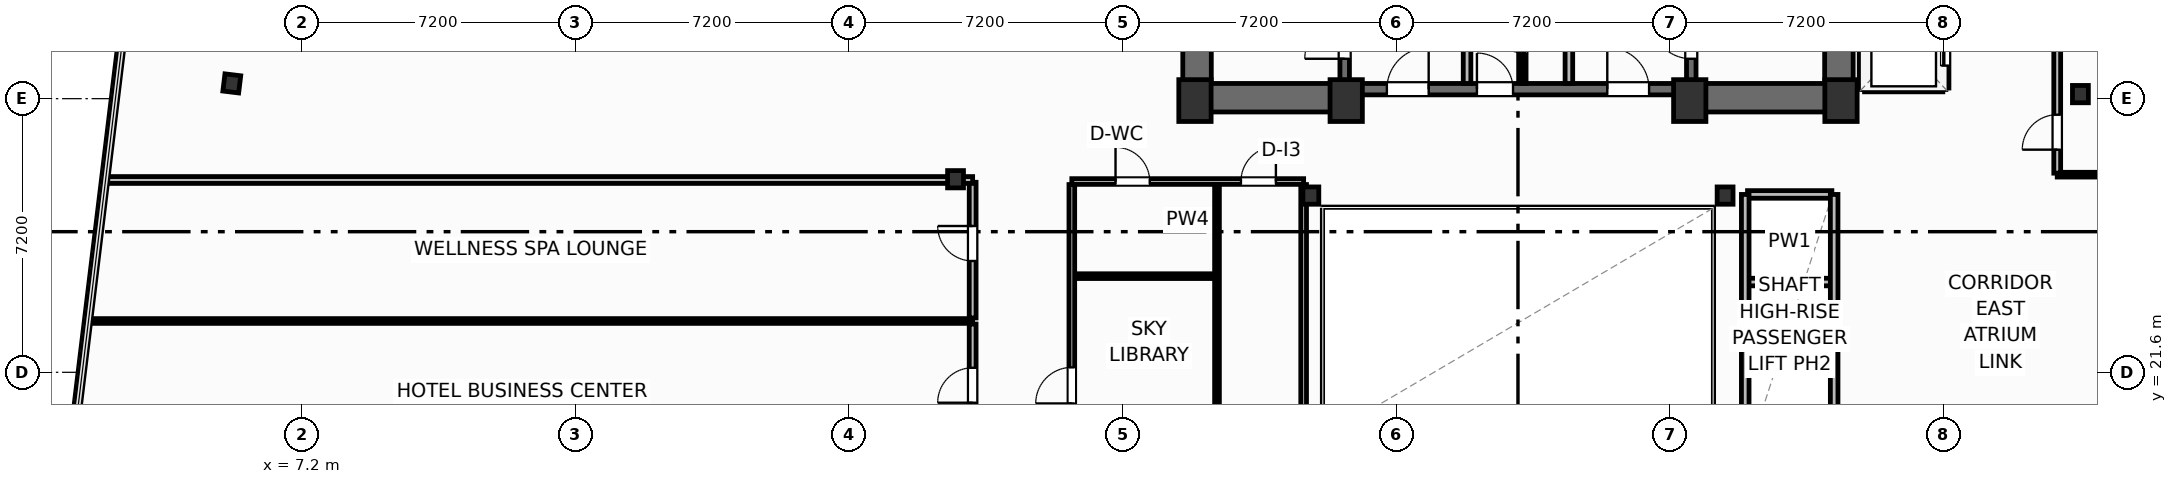
"""IFC4 building model, lengths in metres.
Left out: names, types, materials, properties, quantities, classifications, styles, units other than length and angle.
Written with IfcOpenShell. Run it as: python <this file> out.ifc"""

import sys

from ifc_helpers import new_model, si_unit, direction, frame, frame_2d, origin, origin_2d, place, context, subcontext, project, spatial, rectangle, i_section, extrude, element, fill, save


model = new_model("IFC4")
c1 = context("Model", 3, precision=1e-05, world=origin(), true_north=direction((0.0, 1.0)))
c2 = subcontext(c1, "Body", "Model", "MODEL_VIEW")
j1 = project(units=[si_unit("LENGTHUNIT", "METRE"), si_unit("PLANEANGLEUNIT", "RADIAN")], contexts=[c1])
p1 = place(None, origin())
s1 = spatial("IfcSite", under=j1, at=p1, CompositionType="ELEMENT")
p2 = place(p1, origin())
s2 = spatial("IfcBuilding", under=s1, at=p2, CompositionType="ELEMENT")
p3 = place(p2, frame((0.0, 0.0, 151.3)))
s3 = spatial("IfcBuildingStorey", under=s2, at=p3, CompositionType="ELEMENT", Elevation=151.3)
for number, where, z_axis, x_axis in (
    (1, (30.7, 28.75, 0.0), (0.0, 0.0, 1.0), (1.0, 0.0, 0.0)),
    (2, (34.68, 28.75, 0.0), (0.0, 0.0, 1.0), (1.0, 0.0, 0.0)),
    (3, (43.72, 28.75, 0.0), (0.0, 0.0, 1.0), (1.0, 0.0, 0.0)),
    (4, (47.7, 28.75, 0.0), (0.0, 0.0, 1.0), (1.0, 0.0, 0.0)),
):
    element("IfcColumn", number, at=place(p3, frame(where, z_axis=z_axis, x_axis=x_axis)), inside=s3, PredefinedType="COLUMN", context=c2, shape_type="SweptSolid", body=[
        extrude(rectangle(XDim=0.85, YDim=1.1, at=origin_2d()), origin(), (0.0, 0.0, 1.0), 3.7),
    ])
for number, where, z_axis, x_axis in (
    (5, (33.75, 26.25, 0.0), (0.0, 0.0, 1.0), (1.0, 0.0, 0.0)),
    (6, (44.65, 26.25, 0.0), (0.0, 0.0, 1.0), (1.0, 0.0, 0.0)),
    (7, (24.4, 26.68, 0.0), (0.0, 0.0, 1.0), (1.0, 0.0, 0.0)),
    (8, (54.0, 28.92, 0.0), (0.0, 0.0, 1.0), (1.0, 0.0, 0.0)),
):
    element("IfcColumn", number, at=place(p3, frame(where, z_axis=z_axis, x_axis=x_axis)), inside=s3, PredefinedType="COLUMN", context=c2, shape_type="SweptSolid", body=[
        extrude(i_section(OverallWidth=0.418, OverallDepth=0.455, WebThickness=0.042, FlangeThickness=0.068, FilletRadius=0.025, at=origin_2d()), origin(), (0.0, 0.0, 1.0), 3.7),
    ])
for number, where, z_axis, x_axis in (
    (9, (30.755, 29.2, 0.0), (0.0, 0.0, 1.0), (0.0, 1.0, 0.0)),
    (10, (47.645, 29.2, 0.0), (0.0, 0.0, 1.0), (0.0, 1.0, 0.0)),
):
    element("IfcWall", number, at=place(p3, frame(where, z_axis=z_axis, x_axis=x_axis)), inside=s3, PredefinedType="SHEAR", context=c2, shape_type="SweptSolid", body=[
        extrude(rectangle(XDim=9.22, YDim=0.75, at=frame_2d((4.61, 0.0))), origin(), (0.0, 0.0, 1.0), 3.45),
    ])
p4 = place(p3, frame((30.38, 28.825, 0.0), z_axis=(0.0, 0.0, 1.0), x_axis=(1.0, 0.0, 0.0)))
e11 = element("IfcWall", 11, at=p4, inside=s3, PredefinedType="SHEAR", context=c2, shape_type="SweptSolid", body=[
    extrude(rectangle(XDim=4.42, YDim=0.75, at=frame_2d((2.21, 0.0))), origin(), (0.0, 0.0, 1.0), 3.45),
])
p5 = place(p3, frame((43.6, 28.825, 0.0), z_axis=(0.0, 0.0, 1.0), x_axis=(1.0, 0.0, 0.0)))
e12 = element("IfcWall", 12, at=p5, inside=s3, PredefinedType="SHEAR", context=c2, shape_type="SweptSolid", body=[
    extrude(rectangle(XDim=4.42, YDim=0.75, at=frame_2d((2.21, 0.0))), origin(), (0.0, 0.0, 1.0), 3.45),
])
p6 = place(p3, frame((34.8, 29.05, 0.0), z_axis=(0.0, 0.0, 1.0), x_axis=(1.0, 0.0, 0.0)))
e13 = element("IfcWall", 13, at=p6, inside=s3, PredefinedType="SHEAR", context=c2, shape_type="SweptSolid", body=[
    extrude(rectangle(XDim=8.8, YDim=0.3, at=frame_2d((4.4, 0.0))), origin(), (0.0, 0.0, 1.0), 3.45),
])
p7 = place(p6, frame((0.95, 0.0, 0.0)))
e14 = element("IfcOpeningElement", 14, at=p7, cuts=e13, PredefinedType="OPENING", context=c2, shape_type="SweptSolid", body=[
    extrude(rectangle(XDim=1.1, YDim=2.15, at=frame_2d((0.55, 1.075))), frame((0.0, 0.16, 0.0), z_axis=(0.0, -1.0, 0.0), x_axis=(1.0, 0.0, 0.0)), (0.0, 0.0, 1.0), 0.32),
])
p8 = place(p6, frame((6.75, 0.0, 0.0)))
e15 = element("IfcOpeningElement", 15, at=p8, cuts=e13, PredefinedType="OPENING", context=c2, shape_type="SweptSolid", body=[
    extrude(rectangle(XDim=1.1, YDim=2.15, at=frame_2d((0.55, 1.075))), frame((0.0, 0.16, 0.0), z_axis=(0.0, -1.0, 0.0), x_axis=(1.0, 0.0, 0.0)), (0.0, 0.0, 1.0), 0.32),
])
p9 = place(p6, frame((3.32, 0.0, 0.0)))
e16 = element("IfcOpeningElement", 16, at=p9, cuts=e13, PredefinedType="OPENING", context=c2, shape_type="SweptSolid", body=[
    extrude(rectangle(XDim=0.95, YDim=2.15, at=frame_2d((0.475, 1.075))), frame((0.0, 0.16, 0.0), z_axis=(0.0, -1.0, 0.0), x_axis=(1.0, 0.0, 0.0)), (0.0, 0.0, 1.0), 0.32),
])
p10 = place(p3, frame((34.64, 29.2, 0.0), z_axis=(0.0, 0.0, 1.0), x_axis=(0.0, 1.0, 0.0)))
e17 = element("IfcWall", 17, at=p10, inside=s3, PredefinedType="SHEAR", context=c2, shape_type="SweptSolid", body=[
    extrude(rectangle(XDim=9.22, YDim=0.25, at=frame_2d((4.61, 0.0))), origin(), (0.0, 0.0, 1.0), 3.45),
])
p11 = place(p10, frame((0.65, 0.0, 0.0)))
e18 = element("IfcOpeningElement", 18, at=p11, cuts=e17, PredefinedType="OPENING", context=c2, shape_type="SweptSolid", body=[
    extrude(rectangle(XDim=1.05, YDim=2.15, at=frame_2d((0.525, 1.075))), frame((0.0, 0.135, 0.0), z_axis=(0.0, -1.0, 0.0), x_axis=(1.0, 0.0, 0.0)), (0.0, 0.0, 1.0), 0.27),
])
p12 = place(p3, frame((43.76, 29.2, 0.0), z_axis=(0.0, 0.0, 1.0), x_axis=(0.0, 1.0, 0.0)))
e19 = element("IfcWall", 19, at=p12, inside=s3, PredefinedType="SHEAR", context=c2, shape_type="SweptSolid", body=[
    extrude(rectangle(XDim=9.22, YDim=0.25, at=frame_2d((4.61, 0.0))), origin(), (0.0, 0.0, 1.0), 3.45),
])
p13 = place(p12, frame((0.65, 0.0, 0.0)))
e20 = element("IfcOpeningElement", 20, at=p13, cuts=e19, PredefinedType="OPENING", context=c2, shape_type="SweptSolid", body=[
    extrude(rectangle(XDim=1.05, YDim=2.15, at=frame_2d((0.525, 1.075))), frame((0.0, 0.135, 0.0), z_axis=(0.0, -1.0, 0.0), x_axis=(1.0, 0.0, 0.0)), (0.0, 0.0, 1.0), 0.27),
])
p14 = place(p3, frame((5.355, 29.201, 0.0), z_axis=(0.0, 0.0, 1.0), x_axis=(0.992732158755, -0.12034475881, 0.0)))
e21 = element("IfcColumn", 21, at=p14, inside=s3, PredefinedType="COLUMN", context=c2, shape_type="SweptSolid", body=[
    extrude(i_section(OverallWidth=0.418, OverallDepth=0.455, WebThickness=0.042, FlangeThickness=0.068, FilletRadius=0.025, at=origin_2d()), origin(), (0.0, 0.0, 1.0), 3.7),
])
p15 = place(p3, frame((24.85, 19.3, 0.0), z_axis=(0.0, 0.0, 1.0), x_axis=(0.0, 1.0, 0.0)))
e22 = element("IfcWall", 22, at=p15, inside=s3, PredefinedType="PARTITIONING", context=c2, shape_type="SweptSolid", body=[
    extrude(rectangle(XDim=3.57, YDim=0.18, at=frame_2d((1.785, 0.0))), origin(), (0.0, 0.0, 1.0), 3.45),
])
p16 = place(p15, frame((1.5, 0.0, 0.0)))
e23 = element("IfcOpeningElement", 23, at=p16, cuts=e22, PredefinedType="OPENING", context=c2, shape_type="SweptSolid", body=[
    extrude(rectangle(XDim=0.92, YDim=2.05, at=frame_2d((0.46, 1.025))), frame((0.0, 0.1, 0.0), z_axis=(0.0, -1.0, 0.0), x_axis=(1.0, 0.0, 0.0)), (0.0, 0.0, 1.0), 0.2),
])
p17 = place(p3, frame((24.85, 23.03, 0.0), z_axis=(0.0, 0.0, 1.0), x_axis=(0.0, 1.0, 0.0)))
e24 = element("IfcWall", 24, at=p17, inside=s3, PredefinedType="PARTITIONING", context=c2, shape_type="SweptSolid", body=[
    extrude(rectangle(XDim=3.57, YDim=0.18, at=frame_2d((1.785, 0.0))), origin(), (0.0, 0.0, 1.0), 3.45),
])
p18 = place(p17, frame((1.5, 0.0, 0.0)))
e25 = element("IfcOpeningElement", 25, at=p18, cuts=e24, PredefinedType="OPENING", context=c2, shape_type="SweptSolid", body=[
    extrude(rectangle(XDim=0.92, YDim=2.05, at=frame_2d((0.46, 1.025))), frame((0.0, 0.1, 0.0), z_axis=(0.0, -1.0, 0.0), x_axis=(1.0, 0.0, 0.0)), (0.0, 0.0, 1.0), 0.2),
])
p19 = place(p3, frame((1.624, 22.95, 0.0), z_axis=(0.0, 0.0, 1.0), x_axis=(1.0, 0.0, 0.0)))
e26 = element("IfcWall", 26, at=p19, inside=s3, PredefinedType="PARTITIONING", context=c2, shape_type="SweptSolid", body=[
    extrude(rectangle(XDim=23.226, YDim=0.125, at=frame_2d((11.613, 0.0))), origin(), (0.0, 0.0, 1.0), 3.45),
])
p20 = place(p3, frame((2.073, 26.66, 0.0), z_axis=(0.0, 0.0, 1.0), x_axis=(1.0, 0.0, 0.0)))
e27 = element("IfcWall", 27, at=p20, inside=s3, PredefinedType="PARTITIONING", context=c2, shape_type="SweptSolid", body=[
    extrude(rectangle(XDim=22.777, YDim=0.18, at=frame_2d((11.388, 0.0))), origin(), (0.0, 0.0, 1.0), 2.662),
])
p21 = place(p3, frame((53.39, 26.8, 0.0), z_axis=(0.0, 0.0, 1.0), x_axis=(1.0, 0.0, 0.0)))
e28 = element("IfcWall", 28, at=p21, inside=s3, PredefinedType="PARTITIONING", context=c2, shape_type="SweptSolid", body=[
    extrude(rectangle(XDim=23.283, YDim=0.125, at=frame_2d((11.642, 0.0))), origin(), (0.0, 0.0, 1.0), 3.45),
])
p22 = place(p3, frame((53.39, 26.84, 0.0), z_axis=(0.0, 0.0, 1.0), x_axis=(0.0, 1.0, 0.0)))
e29 = element("IfcWall", 29, at=p22, inside=s3, PredefinedType="PARTITIONING", context=c2, shape_type="SweptSolid", body=[
    extrude(rectangle(XDim=12.46, YDim=0.18, at=frame_2d((6.23, 0.0))), origin(), (0.0, 0.0, 1.0), 3.45),
])
p23 = place(p22, frame((0.618, 0.0, 0.0)))
e30 = element("IfcOpeningElement", 30, at=p23, cuts=e29, PredefinedType="OPENING", context=c2, shape_type="SweptSolid", body=[
    extrude(rectangle(XDim=0.92, YDim=2.05, at=frame_2d((0.46, 1.025))), frame((0.0, 0.1, 0.0), z_axis=(0.0, -1.0, 0.0), x_axis=(1.0, 0.0, 0.0)), (0.0, 0.0, 1.0), 0.2),
])
for number, where, z_axis, x_axis in (
    (31, (37.86, 29.2, 0.0), (0.0, 0.0, 1.0), (0.0, 1.0, 0.0)),
    (32, (40.54, 29.2, 0.0), (0.0, 0.0, 1.0), (0.0, 1.0, 0.0)),
):
    element("IfcWall", number, at=place(p3, frame(where, z_axis=z_axis, x_axis=x_axis)), inside=s3, PredefinedType="PARTITIONING", context=c2, shape_type="SweptSolid", body=[
        extrude(rectangle(XDim=5.18, YDim=0.2, at=frame_2d((2.59, 0.0))), origin(), (0.0, 0.0, 1.0), 3.45),
    ])
p24 = place(p3, frame((39.35, 29.2, 0.0), z_axis=(0.0, 0.0, 1.0), x_axis=(0.0, 1.0, 0.0)))
e33 = element("IfcWall", 33, at=p24, inside=s3, PredefinedType="PARTITIONING", context=c2, shape_type="SweptSolid", body=[
    extrude(rectangle(XDim=5.22, YDim=0.125, at=frame_2d((2.61, 0.0))), origin(), (0.0, 0.0, 1.0), 3.45),
])
p25 = place(p24, frame((0.8, 0.0, 0.0)))
e34 = element("IfcOpeningElement", 34, at=p25, cuts=e33, PredefinedType="OPENING", context=c2, shape_type="SweptSolid", body=[
    extrude(rectangle(XDim=0.85, YDim=2.05, at=frame_2d((0.425, 1.025))), frame((0.0, 0.073, 0.0), z_axis=(0.0, -1.0, 0.0), x_axis=(1.0, 0.0, 0.0)), (0.0, 0.0, 1.0), 0.145),
])
p26 = place(p24, frame((3.4, 0.0, 0.0)))
e35 = element("IfcOpeningElement", 35, at=p26, cuts=e33, PredefinedType="OPENING", context=c2, shape_type="SweptSolid", body=[
    extrude(rectangle(XDim=0.85, YDim=2.05, at=frame_2d((0.425, 1.025))), frame((0.0, 0.073, 0.0), z_axis=(0.0, -1.0, 0.0), x_axis=(1.0, 0.0, 0.0)), (0.0, 0.0, 1.0), 0.145),
])
p27 = place(p3, frame((27.46, 26.62, 0.0), z_axis=(0.0, 0.0, 1.0), x_axis=(1.0, 0.0, 0.0)))
e36 = element("IfcWall", 36, at=p27, inside=s3, PredefinedType="PARTITIONING", context=c2, shape_type="SweptSolid", body=[
    extrude(rectangle(XDim=6.1, YDim=0.15, at=frame_2d((3.05, 0.0))), origin(), (0.0, 0.0, 1.0), 2.662),
])
p28 = place(p27, frame((1.15, 0.0, 0.0)))
e37 = element("IfcOpeningElement", 37, at=p28, cuts=e36, PredefinedType="OPENING", context=c2, shape_type="SweptSolid", body=[
    extrude(rectangle(XDim=0.9, YDim=2.05, at=frame_2d((0.45, 1.025))), frame((0.0, 0.085, 0.0), z_axis=(0.0, -1.0, 0.0), x_axis=(1.0, 0.0, 0.0)), (0.0, 0.0, 1.0), 0.17),
])
p29 = place(p27, frame((4.45, 0.0, 0.0)))
e38 = element("IfcOpeningElement", 38, at=p29, cuts=e36, PredefinedType="OPENING", context=c2, shape_type="SweptSolid", body=[
    extrude(rectangle(XDim=0.92, YDim=2.05, at=frame_2d((0.46, 1.025))), frame((0.0, 0.085, 0.0), z_axis=(0.0, -1.0, 0.0), x_axis=(1.0, 0.0, 0.0)), (0.0, 0.0, 1.0), 0.17),
])
p30 = place(p3, frame((31.28, 19.38, 0.0), z_axis=(0.0, 0.0, 1.0), x_axis=(0.0, 1.0, 0.0)))
e39 = element("IfcWall", 39, at=p30, inside=s3, PredefinedType="PARTITIONING", context=c2, shape_type="SweptSolid", body=[
    extrude(rectangle(XDim=7.16, YDim=0.125, at=frame_2d((3.58, 0.0))), origin(), (0.0, 0.0, 1.0), 3.45),
])
p31 = place(p3, frame((27.52, 24.13, 0.0), z_axis=(0.0, 0.0, 1.0), x_axis=(1.0, 0.0, 0.0)))
e40 = element("IfcWall", 40, at=p31, inside=s3, PredefinedType="PARTITIONING", context=c2, shape_type="SweptSolid", body=[
    extrude(rectangle(XDim=3.7, YDim=0.125, at=frame_2d((1.85, 0.0))), origin(), (0.0, 0.0, 1.0), 3.45),
])
p32 = place(p3, frame((27.46, 19.38, 0.0), z_axis=(0.0, 0.0, 1.0), x_axis=(0.0, 1.0, 0.0)))
e41 = element("IfcWall", 41, at=p32, inside=s3, PredefinedType="PARTITIONING", context=c2, shape_type="SweptSolid", body=[
    extrude(rectangle(XDim=7.16, YDim=0.15, at=frame_2d((3.58, 0.0))), origin(), (0.0, 0.0, 1.0), 3.45),
])
p33 = place(p32, frame((1.4, 0.0, 0.0)))
e42 = element("IfcOpeningElement", 42, at=p33, cuts=e41, PredefinedType="OPENING", context=c2, shape_type="SweptSolid", body=[
    extrude(rectangle(XDim=0.95, YDim=2.05, at=frame_2d((0.475, 1.025))), frame((0.0, 0.085, 0.0), z_axis=(0.0, -1.0, 0.0), x_axis=(1.0, 0.0, 0.0)), (0.0, 0.0, 1.0), 0.17),
])
p34 = place(p3, frame((33.56, 19.38, 0.0), z_axis=(0.0, 0.0, 1.0), x_axis=(0.0, 1.0, 0.0)))
e43 = element("IfcWall", 43, at=p34, inside=s3, PredefinedType="PARTITIONING", context=c2, shape_type="SweptSolid", body=[
    extrude(rectangle(XDim=7.16, YDim=0.15, at=frame_2d((3.58, 0.0))), origin(), (0.0, 0.0, 1.0), 2.824),
])
p35 = place(p3, frame((48.32, 29.08, 0.0), z_axis=(0.0, 0.0, 1.0), x_axis=(1.0, 0.0, 0.0)))
e44 = element("IfcWall", 44, at=p35, inside=s3, PredefinedType="PARTITIONING", context=c2, shape_type="SweptSolid", body=[
    extrude(rectangle(XDim=2.06, YDim=0.2, at=frame_2d((1.03, 0.0))), origin(), (0.0, 0.0, 1.0), 2.662),
])
p36 = place(p3, frame((48.28, 29.08, 0.0), z_axis=(0.0, 0.0, 1.0), x_axis=(0.0, 1.0, 0.0)))
e45 = element("IfcWall", 45, at=p36, inside=s3, PredefinedType="PARTITIONING", context=c2, shape_type="SweptSolid", body=[
    extrude(rectangle(XDim=6.89, YDim=0.2, at=frame_2d((3.445, 0.0))), origin(), (0.0, 0.0, 1.0), 3.45),
])
p37 = place(p3, frame((50.44, 29.08, 0.0), z_axis=(0.0, 0.0, 1.0), x_axis=(0.0, 1.0, 0.0)))
e46 = element("IfcWall", 46, at=p37, inside=s3, PredefinedType="PARTITIONING", context=c2, shape_type="SweptSolid", body=[
    extrude(rectangle(XDim=6.89, YDim=0.2, at=frame_2d((3.445, 0.0))), origin(), (0.0, 0.0, 1.0), 3.45),
])
p38 = place(p37, frame((0.59, 0.0, 0.0)))
e47 = element("IfcOpeningElement", 47, at=p38, cuts=e46, PredefinedType="OPENING", context=c2, shape_type="SweptSolid", body=[
    extrude(rectangle(XDim=1.1, YDim=2.15, at=frame_2d((0.55, 1.075))), frame((0.0, 0.11, 0.0), z_axis=(0.0, -1.0, 0.0), x_axis=(1.0, 0.0, 0.0)), (0.0, 0.0, 1.0), 0.22),
])
p39 = place(p37, frame((2.89, 0.0, 0.0)))
e48 = element("IfcOpeningElement", 48, at=p39, cuts=e46, PredefinedType="OPENING", context=c2, shape_type="SweptSolid", body=[
    extrude(rectangle(XDim=1.1, YDim=2.15, at=frame_2d((0.55, 1.075))), frame((0.0, 0.11, 0.0), z_axis=(0.0, -1.0, 0.0), x_axis=(1.0, 0.0, 0.0)), (0.0, 0.0, 1.0), 0.22),
])
p40 = place(p37, frame((5.19, 0.0, 0.0)))
e49 = element("IfcOpeningElement", 49, at=p40, cuts=e46, PredefinedType="OPENING", context=c2, shape_type="SweptSolid", body=[
    extrude(rectangle(XDim=1.1, YDim=2.15, at=frame_2d((0.55, 1.075))), frame((0.0, 0.11, 0.0), z_axis=(0.0, -1.0, 0.0), x_axis=(1.0, 0.0, 0.0)), (0.0, 0.0, 1.0), 0.22),
])
for number, where, z_axis, x_axis in (
    (50, (45.24, 21.675, 0.0), (0.0, 0.0, 1.0), (1.0, 0.0, 0.0)),
    (51, (45.24, 23.975, 0.0), (0.0, 0.0, 1.0), (1.0, 0.0, 0.0)),
    (52, (45.24, 26.28, 0.0), (0.0, 0.0, 1.0), (1.0, 0.0, 0.0)),
):
    element("IfcWall", number, at=place(p3, frame(where, z_axis=z_axis, x_axis=x_axis)), inside=s3, PredefinedType="PARTITIONING", context=c2, shape_type="SweptSolid", body=[
        extrude(rectangle(XDim=2.22, YDim=0.2, at=frame_2d((1.11, 0.0))), origin(), (0.0, 0.0, 1.0), 3.45),
    ])
for number, where, z_axis, x_axis in (
    (53, (45.18, 19.38, 0.0), (0.0, 0.0, 1.0), (0.0, 1.0, 0.0)),
    (54, (47.52, 19.38, 0.0), (0.0, 0.0, 1.0), (0.0, 1.0, 0.0)),
):
    element("IfcWall", number, at=place(p3, frame(where, z_axis=z_axis, x_axis=x_axis)), inside=s3, PredefinedType="PARTITIONING", context=c2, shape_type="SweptSolid", body=[
        extrude(rectangle(XDim=6.9, YDim=0.2, at=frame_2d((3.45, 0.0))), origin(), (0.0, 0.0, 1.0), 3.45),
    ])
p41 = place(p16, origin())
e55 = element("IfcDoor", 55, at=p41, inside=s3, OperationType="SINGLE_SWING_LEFT", PredefinedType="DOOR", context=c2, shape_type="SweptSolid", body=[
    extrude(rectangle(XDim=0.92, YDim=2.05, at=frame_2d((0.46, 1.025))), frame((0.0, 0.025, 0.0), z_axis=(0.0, -1.0, 0.0), x_axis=(1.0, 0.0, 0.0)), (0.0, 0.0, 1.0), 0.05),
])
fill(e23, e55)
p42 = place(p18, origin())
e56 = element("IfcDoor", 56, at=p42, inside=s3, OperationType="SINGLE_SWING_RIGHT", PredefinedType="DOOR", context=c2, shape_type="SweptSolid", body=[
    extrude(rectangle(XDim=0.92, YDim=2.05, at=frame_2d((0.46, 1.025))), frame((0.0, 0.025, 0.0), z_axis=(0.0, -1.0, 0.0), x_axis=(1.0, 0.0, 0.0)), (0.0, 0.0, 1.0), 0.05),
])
fill(e25, e56)
p43 = place(p23, origin())
e57 = element("IfcDoor", 57, at=p43, inside=s3, OperationType="SINGLE_SWING_LEFT", PredefinedType="DOOR", context=c2, shape_type="SweptSolid", body=[
    extrude(rectangle(XDim=0.92, YDim=2.05, at=frame_2d((0.46, 1.025))), frame((0.0, 0.025, 0.0), z_axis=(0.0, -1.0, 0.0), x_axis=(1.0, 0.0, 0.0)), (0.0, 0.0, 1.0), 0.05),
])
fill(e30, e57)
p44 = place(p11, origin())
e58 = element("IfcDoor", 58, at=p44, inside=s3, OperationType="SINGLE_SWING_LEFT", PredefinedType="DOOR", context=c2, shape_type="SweptSolid", body=[
    extrude(rectangle(XDim=1.05, YDim=2.15, at=frame_2d((0.525, 1.075))), frame((0.0, 0.025, 0.0), z_axis=(0.0, -1.0, 0.0), x_axis=(1.0, 0.0, 0.0)), (0.0, 0.0, 1.0), 0.05),
])
fill(e18, e58)
p45 = place(p13, origin())
e59 = element("IfcDoor", 59, at=p45, inside=s3, OperationType="SINGLE_SWING_RIGHT", PredefinedType="DOOR", context=c2, shape_type="SweptSolid", body=[
    extrude(rectangle(XDim=1.05, YDim=2.15, at=frame_2d((0.525, 1.075))), frame((0.0, 0.025, 0.0), z_axis=(0.0, -1.0, 0.0), x_axis=(1.0, 0.0, 0.0)), (0.0, 0.0, 1.0), 0.05),
])
fill(e20, e59)
p46 = place(p7, origin())
e60 = element("IfcDoor", 60, at=p46, inside=s3, OperationType="SINGLE_SWING_RIGHT", PredefinedType="DOOR", context=c2, shape_type="SweptSolid", body=[
    extrude(rectangle(XDim=1.1, YDim=2.15, at=frame_2d((0.55, 1.075))), frame((0.0, 0.025, 0.0), z_axis=(0.0, -1.0, 0.0), x_axis=(1.0, 0.0, 0.0)), (0.0, 0.0, 1.0), 0.05),
])
fill(e14, e60)
p47 = place(p8, origin())
e61 = element("IfcDoor", 61, at=p47, inside=s3, OperationType="SINGLE_SWING_LEFT", PredefinedType="DOOR", context=c2, shape_type="SweptSolid", body=[
    extrude(rectangle(XDim=1.1, YDim=2.15, at=frame_2d((0.55, 1.075))), frame((0.0, 0.025, 0.0), z_axis=(0.0, -1.0, 0.0), x_axis=(1.0, 0.0, 0.0)), (0.0, 0.0, 1.0), 0.05),
])
fill(e15, e61)
p48 = place(p25, origin())
e62 = element("IfcDoor", 62, at=p48, inside=s3, OperationType="SINGLE_SWING_RIGHT", PredefinedType="DOOR", context=c2, shape_type="SweptSolid", body=[
    extrude(rectangle(XDim=0.85, YDim=2.05, at=frame_2d((0.425, 1.025))), frame((0.0, 0.025, 0.0), z_axis=(0.0, -1.0, 0.0), x_axis=(1.0, 0.0, 0.0)), (0.0, 0.0, 1.0), 0.05),
])
fill(e34, e62)
p49 = place(p9, origin())
e63 = element("IfcDoor", 63, at=p49, inside=s3, OperationType="SINGLE_SWING_LEFT", PredefinedType="DOOR", context=c2, shape_type="SweptSolid", body=[
    extrude(rectangle(XDim=0.95, YDim=2.15, at=frame_2d((0.475, 1.075))), frame((0.0, 0.025, 0.0), z_axis=(0.0, -1.0, 0.0), x_axis=(1.0, 0.0, 0.0)), (0.0, 0.0, 1.0), 0.05),
])
fill(e16, e63)
p50 = place(p28, origin())
e64 = element("IfcDoor", 64, at=p50, inside=s3, OperationType="SINGLE_SWING_LEFT", PredefinedType="DOOR", context=c2, shape_type="SweptSolid", body=[
    extrude(rectangle(XDim=0.9, YDim=2.05, at=frame_2d((0.45, 1.025))), frame((0.0, 0.025, 0.0), z_axis=(0.0, -1.0, 0.0), x_axis=(1.0, 0.0, 0.0)), (0.0, 0.0, 1.0), 0.05),
])
fill(e37, e64)
p51 = place(p29, origin())
e65 = element("IfcDoor", 65, at=p51, inside=s3, OperationType="SINGLE_SWING_RIGHT", PredefinedType="DOOR", context=c2, shape_type="SweptSolid", body=[
    extrude(rectangle(XDim=0.92, YDim=2.05, at=frame_2d((0.46, 1.025))), frame((0.0, 0.025, 0.0), z_axis=(0.0, -1.0, 0.0), x_axis=(1.0, 0.0, 0.0)), (0.0, 0.0, 1.0), 0.05),
])
fill(e38, e65)
p52 = place(p33, origin())
e66 = element("IfcDoor", 66, at=p52, inside=s3, OperationType="SINGLE_SWING_LEFT", PredefinedType="DOOR", context=c2, shape_type="SweptSolid", body=[
    extrude(rectangle(XDim=0.95, YDim=2.05, at=frame_2d((0.475, 1.025))), frame((0.0, 0.025, 0.0), z_axis=(0.0, -1.0, 0.0), x_axis=(1.0, 0.0, 0.0)), (0.0, 0.0, 1.0), 0.05),
])
fill(e42, e66)
p53 = place(p38, origin())
e67 = element("IfcDoor", 67, at=p53, inside=s3, OperationType="SLIDING_TO_LEFT", PredefinedType="DOOR", context=c2, shape_type="SweptSolid", body=[
    extrude(rectangle(XDim=1.1, YDim=2.15, at=frame_2d((0.55, 1.075))), frame((0.0, 0.025, 0.0), z_axis=(0.0, -1.0, 0.0), x_axis=(1.0, 0.0, 0.0)), (0.0, 0.0, 1.0), 0.05),
])
fill(e47, e67)
save(model, sys.argv[1])
